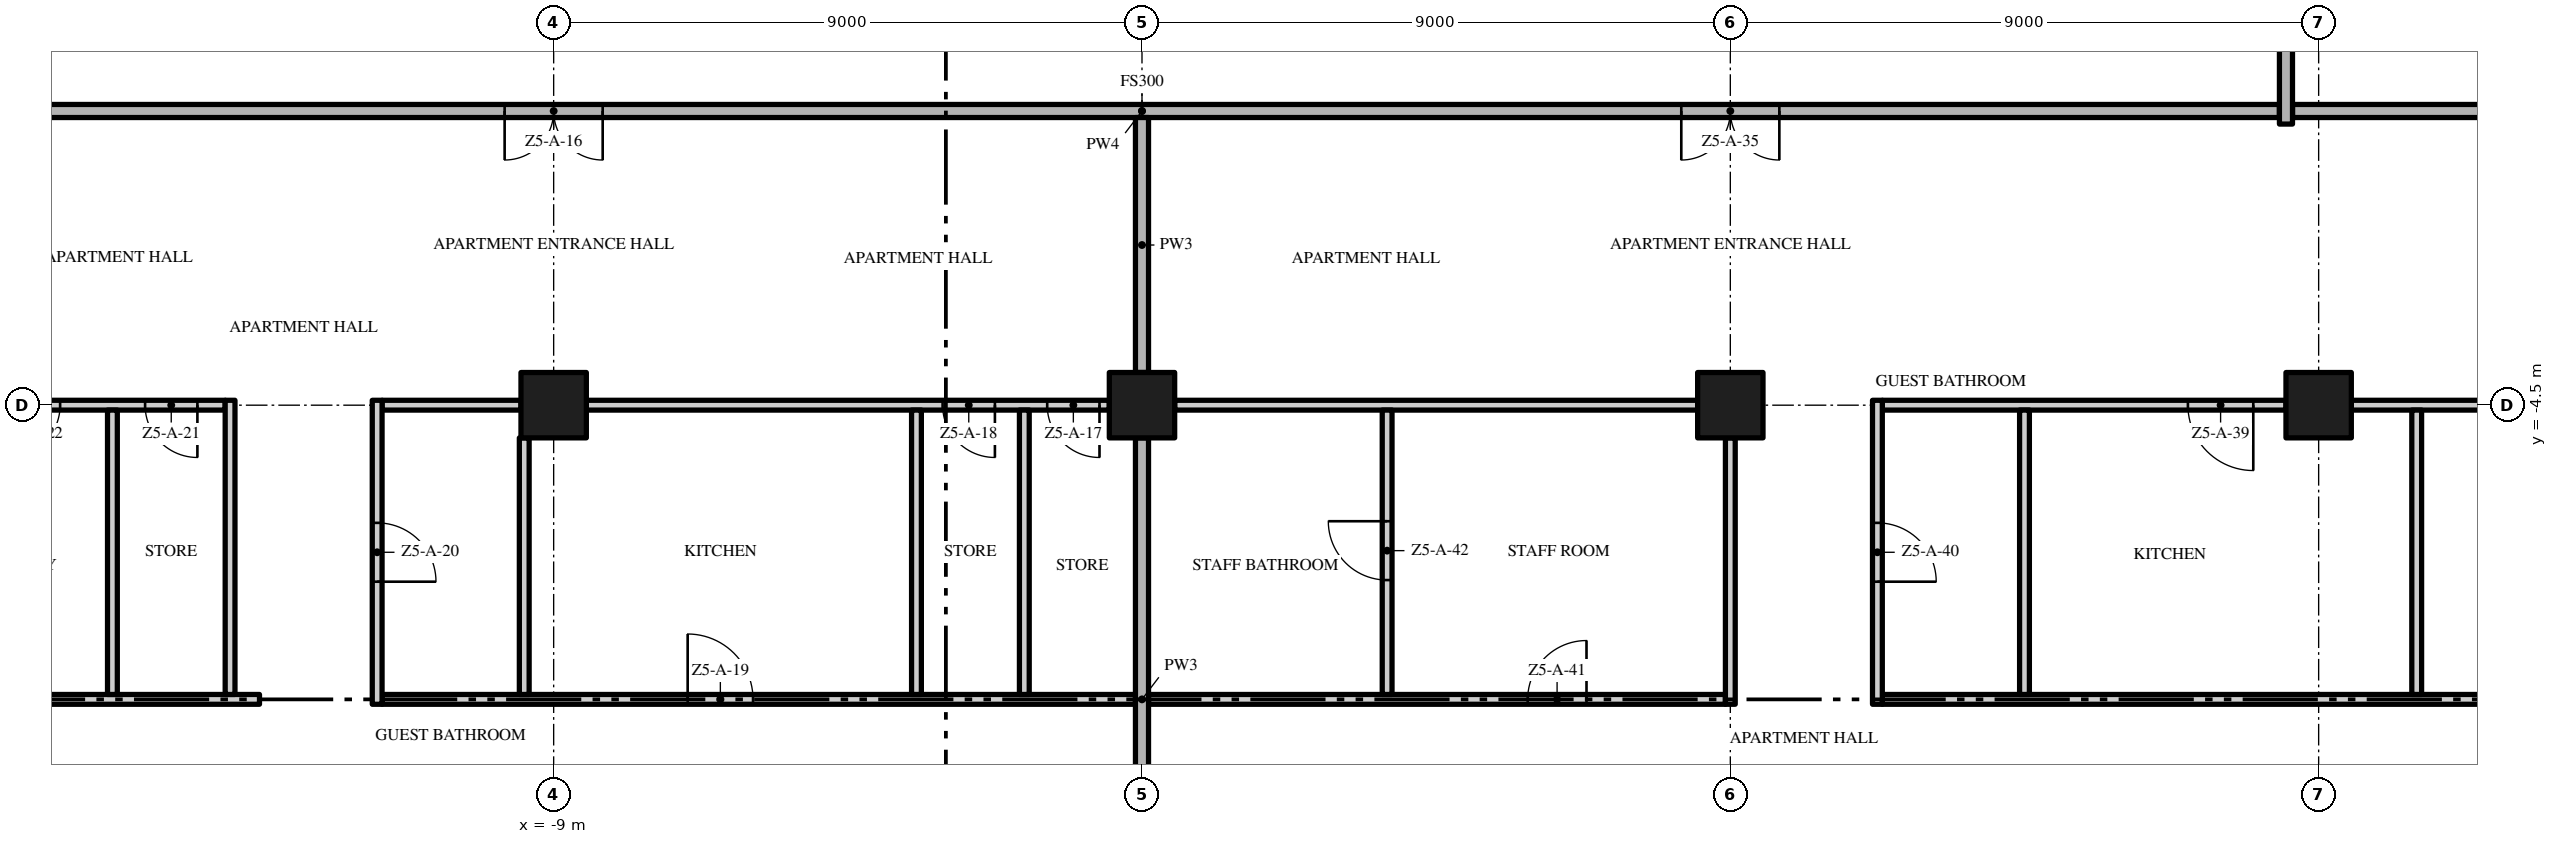
"""IFC4 building model, lengths in metres.
Left out: names, types, materials, properties, quantities, classifications, styles, units other than length and angle.
Written with IfcOpenShell. Run it as: python <this file> out.ifc"""

import sys

from ifc_helpers import new_model, si_unit, direction, frame, frame_2d, origin, origin_2d, place, context, subcontext, project, spatial, rectangle, extrude, element, fill, save


model = new_model("IFC4")
c1 = context("Model", 3, precision=1e-05, world=origin(), true_north=direction((0.0, 1.0)))
c2 = subcontext(c1, "Body", "Model", "MODEL_VIEW")
j1 = project(units=[si_unit("LENGTHUNIT", "METRE"), si_unit("PLANEANGLEUNIT", "RADIAN")], contexts=[c1])
p1 = place(None, origin())
s1 = spatial("IfcSite", under=j1, at=p1, CompositionType="ELEMENT")
p2 = place(p1, origin())
s2 = spatial("IfcBuilding", under=s1, at=p2, CompositionType="ELEMENT")
p3 = place(p2, frame((0.0, 0.0, 246.4)))
s3 = spatial("IfcBuildingStorey", under=s2, at=p3, CompositionType="ELEMENT", Elevation=246.4)
for number, where, z_axis, x_axis in (
    (1, (-9.0, -4.5, 0.0), (0.0, 0.0, 1.0), (1.0, 0.0, 0.0)),
    (2, (0.0, -4.5, 0.0), (0.0, 0.0, 1.0), (1.0, 0.0, 0.0)),
    (3, (18.0, -4.5, 0.0), (0.0, 0.0, 1.0), (1.0, 0.0, 0.0)),
    (4, (9.0, -4.5, 0.0), (0.0, 0.0, 1.0), (1.0, 0.0, 0.0)),
):
    element("IfcColumn", number, at=place(p3, frame(where, z_axis=z_axis, x_axis=x_axis)), inside=s3, PredefinedType="COLUMN", context=c2, shape_type="SweptSolid", body=[
        extrude(rectangle(XDim=1.0, YDim=1.0, at=origin_2d()), origin(), (0.0, 0.0, 1.0), 3.5),
    ])
p4 = place(p3, frame((-26.7, -9.0, 0.0), z_axis=(0.0, 0.0, 1.0), x_axis=(1.0, 0.0, 0.0)))
e5 = element("IfcWall", 5, at=p4, inside=s3, PredefinedType="PARTITIONING", context=c2, shape_type="SweptSolid", body=[
    extrude(rectangle(XDim=13.2, YDim=0.15, at=frame_2d((6.6, 0.0))), origin(), (0.0, 0.0, 1.0), 3.5),
])
p5 = place(p3, frame((-11.625, -9.0, 0.0), z_axis=(0.0, 0.0, 1.0), x_axis=(1.0, 0.0, 0.0)))
e6 = element("IfcWall", 6, at=p5, inside=s3, PredefinedType="PARTITIONING", context=c2, shape_type="SweptSolid", body=[
    extrude(rectangle(XDim=11.525, YDim=0.15, at=frame_2d((5.763, 0.0))), origin(), (0.0, 0.0, 1.0), 3.5),
])
p6 = place(p5, frame((4.675, 0.0, 0.0)))
e7 = element("IfcOpeningElement", 7, at=p6, cuts=e6, PredefinedType="OPENING", context=c2, shape_type="SweptSolid", body=[
    extrude(rectangle(XDim=1.0, YDim=2.4, at=frame_2d((0.5, 1.2))), frame((0.0, 0.085, 0.0), z_axis=(0.0, -1.0, 0.0), x_axis=(1.0, 0.0, 0.0)), (0.0, 0.0, 1.0), 0.17),
])
p7 = place(p3, frame((0.1, -9.0, 0.0), z_axis=(0.0, 0.0, 1.0), x_axis=(1.0, 0.0, 0.0)))
e8 = element("IfcWall", 8, at=p7, inside=s3, PredefinedType="PARTITIONING", context=c2, shape_type="SweptSolid", body=[
    extrude(rectangle(XDim=8.825, YDim=0.15, at=frame_2d((4.412, 0.0))), origin(), (0.0, 0.0, 1.0), 3.5),
])
p8 = place(p7, frame((5.8, 0.0, 0.0)))
e9 = element("IfcOpeningElement", 9, at=p8, cuts=e8, PredefinedType="OPENING", context=c2, shape_type="SweptSolid", body=[
    extrude(rectangle(XDim=0.9, YDim=2.1, at=frame_2d((0.45, 1.05))), frame((0.0, 0.085, 0.0), z_axis=(0.0, -1.0, 0.0), x_axis=(1.0, 0.0, 0.0)), (0.0, 0.0, 1.0), 0.17),
])
p9 = place(p3, frame((11.325, -9.0, 0.0), z_axis=(0.0, 0.0, 1.0), x_axis=(1.0, 0.0, 0.0)))
e10 = element("IfcWall", 10, at=p9, inside=s3, PredefinedType="PARTITIONING", context=c2, shape_type="SweptSolid", body=[
    extrude(rectangle(XDim=15.375, YDim=0.15, at=frame_2d((7.688, 0.0))), origin(), (0.0, 0.0, 1.0), 3.5),
])
p10 = place(p9, frame((14.375, 0.0, 0.0)))
e11 = element("IfcOpeningElement", 11, at=p10, cuts=e10, PredefinedType="OPENING", context=c2, shape_type="SweptSolid", body=[
    extrude(rectangle(XDim=0.8, YDim=2.0, at=frame_2d((0.4, 1.0))), frame((0.0, 0.085, 0.0), z_axis=(0.0, -1.0, 0.0), x_axis=(1.0, 0.0, 0.0)), (0.0, 0.0, 1.0), 0.17),
])
p11 = place(p3, frame((-14.025, -4.5, 0.0), z_axis=(0.0, 0.0, 1.0), x_axis=(-1.0, 0.0, 0.0)))
e12 = element("IfcWall", 12, at=p11, inside=s3, PredefinedType="PARTITIONING", context=c2, shape_type="SweptSolid", body=[
    extrude(rectangle(XDim=3.475, YDim=0.15, at=frame_2d((1.738, 0.0))), origin(), (0.0, 0.0, 1.0), 3.5),
])
p12 = place(p11, frame((0.425, 0.0, 0.0)))
e13 = element("IfcOpeningElement", 13, at=p12, cuts=e12, PredefinedType="OPENING", context=c2, shape_type="SweptSolid", body=[
    extrude(rectangle(XDim=0.8, YDim=2.0, at=frame_2d((0.4, 1.0))), frame((0.0, 0.085, 0.0), z_axis=(0.0, -1.0, 0.0), x_axis=(1.0, 0.0, 0.0)), (0.0, 0.0, 1.0), 0.17),
])
p13 = place(p11, frame((2.525, 0.0, 0.0)))
e14 = element("IfcOpeningElement", 14, at=p13, cuts=e12, PredefinedType="OPENING", context=c2, shape_type="SweptSolid", body=[
    extrude(rectangle(XDim=0.8, YDim=2.0, at=frame_2d((0.4, 1.0))), frame((0.0, 0.085, 0.0), z_axis=(0.0, -1.0, 0.0), x_axis=(1.0, 0.0, 0.0)), (0.0, 0.0, 1.0), 0.17),
])
p14 = place(p3, frame((-11.625, -4.5, 0.0), z_axis=(0.0, 0.0, 1.0), x_axis=(1.0, 0.0, 0.0)))
e15 = element("IfcWall", 15, at=p14, inside=s3, PredefinedType="PARTITIONING", context=c2, shape_type="SweptSolid", body=[
    extrude(rectangle(XDim=2.125, YDim=0.15, at=frame_2d((1.062, 0.0))), origin(), (0.0, 0.0, 1.0), 3.5),
])
p15 = place(p3, frame((-0.5, -4.5, 0.0), z_axis=(0.0, 0.0, 1.0), x_axis=(-1.0, 0.0, 0.0)))
e16 = element("IfcWall", 16, at=p15, inside=s3, PredefinedType="PARTITIONING", context=c2, shape_type="SweptSolid", body=[
    extrude(rectangle(XDim=8.0, YDim=0.15, at=frame_2d((4.0, 0.0))), origin(), (0.0, 0.0, 1.0), 3.5),
])
p16 = place(p15, frame((0.15, 0.0, 0.0)))
e17 = element("IfcOpeningElement", 17, at=p16, cuts=e16, PredefinedType="OPENING", context=c2, shape_type="SweptSolid", body=[
    extrude(rectangle(XDim=0.8, YDim=2.0, at=frame_2d((0.4, 1.0))), frame((0.0, 0.085, 0.0), z_axis=(0.0, -1.0, 0.0), x_axis=(1.0, 0.0, 0.0)), (0.0, 0.0, 1.0), 0.17),
])
p17 = place(p15, frame((1.75, 0.0, 0.0)))
e18 = element("IfcOpeningElement", 18, at=p17, cuts=e16, PredefinedType="OPENING", context=c2, shape_type="SweptSolid", body=[
    extrude(rectangle(XDim=0.8, YDim=2.0, at=frame_2d((0.4, 1.0))), frame((0.0, 0.085, 0.0), z_axis=(0.0, -1.0, 0.0), x_axis=(1.0, 0.0, 0.0)), (0.0, 0.0, 1.0), 0.17),
])
p18 = place(p3, frame((0.5, -4.5, 0.0), z_axis=(0.0, 0.0, 1.0), x_axis=(1.0, 0.0, 0.0)))
e19 = element("IfcWall", 19, at=p18, inside=s3, PredefinedType="PARTITIONING", context=c2, shape_type="SweptSolid", body=[
    extrude(rectangle(XDim=8.0, YDim=0.15, at=frame_2d((4.0, 0.0))), origin(), (0.0, 0.0, 1.0), 3.5),
])
p19 = place(p3, frame((17.5, -4.5, 0.0), z_axis=(0.0, 0.0, 1.0), x_axis=(-1.0, 0.0, 0.0)))
e20 = element("IfcWall", 20, at=p19, inside=s3, PredefinedType="PARTITIONING", context=c2, shape_type="SweptSolid", body=[
    extrude(rectangle(XDim=6.175, YDim=0.15, at=frame_2d((3.087, 0.0))), origin(), (0.0, 0.0, 1.0), 3.5),
])
p20 = place(p19, frame((0.5, 0.0, 0.0)))
e21 = element("IfcOpeningElement", 21, at=p20, cuts=e20, PredefinedType="OPENING", context=c2, shape_type="SweptSolid", body=[
    extrude(rectangle(XDim=1.0, YDim=2.4, at=frame_2d((0.5, 1.2))), frame((0.0, 0.085, 0.0), z_axis=(0.0, -1.0, 0.0), x_axis=(1.0, 0.0, 0.0)), (0.0, 0.0, 1.0), 0.17),
])
p21 = place(p3, frame((26.1, -4.5, 0.0), z_axis=(0.0, 0.0, 1.0), x_axis=(-1.0, 0.0, 0.0)))
e22 = element("IfcWall", 22, at=p21, inside=s3, PredefinedType="PARTITIONING", context=c2, shape_type="SweptSolid", body=[
    extrude(rectangle(XDim=7.6, YDim=0.15, at=frame_2d((3.8, 0.0))), origin(), (0.0, 0.0, 1.0), 3.5),
])
p22 = place(p21, frame((1.85, 0.0, 0.0)))
e23 = element("IfcOpeningElement", 23, at=p22, cuts=e22, PredefinedType="OPENING", context=c2, shape_type="SweptSolid", body=[
    extrude(rectangle(XDim=0.8, YDim=2.0, at=frame_2d((0.4, 1.0))), frame((0.0, 0.085, 0.0), z_axis=(0.0, -1.0, 0.0), x_axis=(1.0, 0.0, 0.0)), (0.0, 0.0, 1.0), 0.17),
])
p23 = place(p21, frame((4.7, 0.0, 0.0)))
e24 = element("IfcOpeningElement", 24, at=p23, cuts=e22, PredefinedType="OPENING", context=c2, shape_type="SweptSolid", body=[
    extrude(rectangle(XDim=0.8, YDim=2.0, at=frame_2d((0.4, 1.0))), frame((0.0, 0.085, 0.0), z_axis=(0.0, -1.0, 0.0), x_axis=(1.0, 0.0, 0.0)), (0.0, 0.0, 1.0), 0.17),
])
p24 = place(p3, frame((17.4, 0.0, 0.0), z_axis=(0.0, 0.0, 1.0), x_axis=(-1.0, 0.0, 0.0)))
e25 = element("IfcWall", 25, at=p24, inside=s3, PredefinedType="PARTITIONING", context=c2, shape_type="SweptSolid", body=[
    extrude(rectangle(XDim=34.8, YDim=0.2, at=frame_2d((17.4, 0.0))), origin(), (0.0, 0.0, 1.0), 3.5),
])
p25 = place(p24, frame((25.65, 0.0, 0.0)))
e26 = element("IfcOpeningElement", 26, at=p25, cuts=e25, PredefinedType="OPENING", context=c2, shape_type="SweptSolid", body=[
    extrude(rectangle(XDim=1.5, YDim=2.4, at=frame_2d((0.75, 1.2))), frame((0.0, 0.11, 0.0), z_axis=(0.0, -1.0, 0.0), x_axis=(1.0, 0.0, 0.0)), (0.0, 0.0, 1.0), 0.22),
])
p26 = place(p24, frame((7.65, 0.0, 0.0)))
e27 = element("IfcOpeningElement", 27, at=p26, cuts=e25, PredefinedType="OPENING", context=c2, shape_type="SweptSolid", body=[
    extrude(rectangle(XDim=1.5, YDim=2.4, at=frame_2d((0.75, 1.2))), frame((0.0, 0.11, 0.0), z_axis=(0.0, -1.0, 0.0), x_axis=(1.0, 0.0, 0.0)), (0.0, 0.0, 1.0), 0.22),
])
p27 = place(p3, frame((17.6, 0.0, 0.0), z_axis=(0.0, 0.0, 1.0), x_axis=(1.0, 0.0, 0.0)))
e28 = element("IfcWall", 28, at=p27, inside=s3, PredefinedType="PARTITIONING", context=c2, shape_type="SweptSolid", body=[
    extrude(rectangle(XDim=9.1, YDim=0.2, at=frame_2d((4.55, 0.0))), origin(), (0.0, 0.0, 1.0), 3.5),
])
p28 = place(p3, frame((-15.75, -8.925, 0.0), z_axis=(0.0, 0.0, 1.0), x_axis=(0.0, 1.0, 0.0)))
e29 = element("IfcWall", 29, at=p28, inside=s3, PredefinedType="PARTITIONING", context=c2, shape_type="SweptSolid", body=[
    extrude(rectangle(XDim=4.35, YDim=0.15, at=frame_2d((2.175, 0.0))), origin(), (0.0, 0.0, 1.0), 3.5),
])
p29 = place(p3, frame((-13.95, -8.925, 0.0), z_axis=(0.0, 0.0, 1.0), x_axis=(0.0, 1.0, 0.0)))
e30 = element("IfcWall", 30, at=p29, inside=s3, PredefinedType="PARTITIONING", context=c2, shape_type="SweptSolid", body=[
    extrude(rectangle(XDim=4.5, YDim=0.15, at=frame_2d((2.25, 0.0))), origin(), (0.0, 0.0, 1.0), 3.5),
])
p30 = place(p3, frame((-11.7, -4.425, 0.0), z_axis=(0.0, 0.0, 1.0), x_axis=(0.0, -1.0, 0.0)))
e31 = element("IfcWall", 31, at=p30, inside=s3, PredefinedType="PARTITIONING", context=c2, shape_type="SweptSolid", body=[
    extrude(rectangle(XDim=4.65, YDim=0.15, at=frame_2d((2.325, 0.0))), origin(), (0.0, 0.0, 1.0), 3.5),
])
p31 = place(p30, frame((1.875, 0.0, 0.0)))
e32 = element("IfcOpeningElement", 32, at=p31, cuts=e31, PredefinedType="OPENING", context=c2, shape_type="SweptSolid", body=[
    extrude(rectangle(XDim=0.9, YDim=2.1, at=frame_2d((0.45, 1.05))), frame((0.0, 0.085, 0.0), z_axis=(0.0, -1.0, 0.0), x_axis=(1.0, 0.0, 0.0)), (0.0, 0.0, 1.0), 0.17),
])
p32 = place(p3, frame((-9.45, -8.925, 0.0), z_axis=(0.0, 0.0, 1.0), x_axis=(0.0, 1.0, 0.0)))
e33 = element("IfcWall", 33, at=p32, inside=s3, PredefinedType="PARTITIONING", context=c2, shape_type="SweptSolid", body=[
    extrude(rectangle(XDim=3.925, YDim=0.15, at=frame_2d((1.962, 0.0))), origin(), (0.0, 0.0, 1.0), 3.5),
])
for number, where, z_axis, x_axis in (
    (34, (-3.45, -8.925, 0.0), (0.0, 0.0, 1.0), (0.0, 1.0, 0.0)),
    (35, (-1.8, -8.925, 0.0), (0.0, 0.0, 1.0), (0.0, 1.0, 0.0)),
):
    element("IfcWall", number, at=place(p3, frame(where, z_axis=z_axis, x_axis=x_axis)), inside=s3, PredefinedType="PARTITIONING", context=c2, shape_type="SweptSolid", body=[
        extrude(rectangle(XDim=4.35, YDim=0.15, at=frame_2d((2.175, 0.0))), origin(), (0.0, 0.0, 1.0), 3.5),
    ])
p33 = place(p3, frame((0.0, -13.0, 0.0), z_axis=(0.0, 0.0, 1.0), x_axis=(0.0, 1.0, 0.0)))
e36 = element("IfcWall", 36, at=p33, inside=s3, PredefinedType="PARTITIONING", context=c2, shape_type="SweptSolid", body=[
    extrude(rectangle(XDim=8.0, YDim=0.2, at=frame_2d((4.0, 0.0))), origin(), (0.0, 0.0, 1.0), 3.5),
])
p34 = place(p3, frame((0.0, -4.0, 0.0), z_axis=(0.0, 0.0, 1.0), x_axis=(0.0, 1.0, 0.0)))
e37 = element("IfcWall", 37, at=p34, inside=s3, PredefinedType="PARTITIONING", context=c2, shape_type="SweptSolid", body=[
    extrude(rectangle(XDim=3.9, YDim=0.2, at=frame_2d((1.95, 0.0))), origin(), (0.0, 0.0, 1.0), 3.5),
])
p35 = place(p3, frame((3.75, -8.925, 0.0), z_axis=(0.0, 0.0, 1.0), x_axis=(0.0, 1.0, 0.0)))
e38 = element("IfcWall", 38, at=p35, inside=s3, PredefinedType="PARTITIONING", context=c2, shape_type="SweptSolid", body=[
    extrude(rectangle(XDim=4.35, YDim=0.15, at=frame_2d((2.175, 0.0))), origin(), (0.0, 0.0, 1.0), 3.5),
])
p36 = place(p35, frame((1.75, 0.0, 0.0)))
e39 = element("IfcOpeningElement", 39, at=p36, cuts=e38, PredefinedType="OPENING", context=c2, shape_type="SweptSolid", body=[
    extrude(rectangle(XDim=0.9, YDim=2.1, at=frame_2d((0.45, 1.05))), frame((0.0, 0.085, 0.0), z_axis=(0.0, -1.0, 0.0), x_axis=(1.0, 0.0, 0.0)), (0.0, 0.0, 1.0), 0.17),
])
p37 = place(p3, frame((9.0, -9.075, 0.0), z_axis=(0.0, 0.0, 1.0), x_axis=(0.0, 1.0, 0.0)))
e40 = element("IfcWall", 40, at=p37, inside=s3, PredefinedType="PARTITIONING", context=c2, shape_type="SweptSolid", body=[
    extrude(rectangle(XDim=4.075, YDim=0.15, at=frame_2d((2.038, 0.0))), origin(), (0.0, 0.0, 1.0), 3.5),
])
p38 = place(p3, frame((11.25, -4.425, 0.0), z_axis=(0.0, 0.0, 1.0), x_axis=(0.0, -1.0, 0.0)))
e41 = element("IfcWall", 41, at=p38, inside=s3, PredefinedType="PARTITIONING", context=c2, shape_type="SweptSolid", body=[
    extrude(rectangle(XDim=4.65, YDim=0.15, at=frame_2d((2.325, 0.0))), origin(), (0.0, 0.0, 1.0), 3.5),
])
p39 = place(p38, frame((1.875, 0.0, 0.0)))
e42 = element("IfcOpeningElement", 42, at=p39, cuts=e41, PredefinedType="OPENING", context=c2, shape_type="SweptSolid", body=[
    extrude(rectangle(XDim=0.9, YDim=2.1, at=frame_2d((0.45, 1.05))), frame((0.0, 0.085, 0.0), z_axis=(0.0, -1.0, 0.0), x_axis=(1.0, 0.0, 0.0)), (0.0, 0.0, 1.0), 0.17),
])
p40 = place(p3, frame((13.5, -8.925, 0.0), z_axis=(0.0, 0.0, 1.0), x_axis=(0.0, 1.0, 0.0)))
e43 = element("IfcWall", 43, at=p40, inside=s3, PredefinedType="PARTITIONING", context=c2, shape_type="SweptSolid", body=[
    extrude(rectangle(XDim=4.35, YDim=0.15, at=frame_2d((2.175, 0.0))), origin(), (0.0, 0.0, 1.0), 3.5),
])
p41 = place(p3, frame((17.5, -0.2, 0.0), z_axis=(0.0, 0.0, 1.0), x_axis=(0.0, 1.0, 0.0)))
e44 = element("IfcWall", 44, at=p41, inside=s3, PredefinedType="PARTITIONING", context=c2, shape_type="SweptSolid", body=[
    extrude(rectangle(XDim=4.2, YDim=0.2, at=frame_2d((2.1, 0.0))), origin(), (0.0, 0.0, 1.0), 3.5),
])
p42 = place(p3, frame((19.5, -8.925, 0.0), z_axis=(0.0, 0.0, 1.0), x_axis=(0.0, 1.0, 0.0)))
e45 = element("IfcWall", 45, at=p42, inside=s3, PredefinedType="PARTITIONING", context=c2, shape_type="SweptSolid", body=[
    extrude(rectangle(XDim=4.35, YDim=0.15, at=frame_2d((2.175, 0.0))), origin(), (0.0, 0.0, 1.0), 3.5),
])
p43 = place(p25, origin())
e46 = element("IfcDoor", 46, at=p43, inside=s3, OperationType="DOUBLE_DOOR_SINGLE_SWING", PredefinedType="DOOR", context=c2, shape_type="SweptSolid", body=[
    extrude(rectangle(XDim=1.5, YDim=2.4, at=frame_2d((0.75, 1.2))), frame((0.0, 0.025, 0.0), z_axis=(0.0, -1.0, 0.0), x_axis=(1.0, 0.0, 0.0)), (0.0, 0.0, 1.0), 0.05),
])
fill(e26, e46)
p44 = place(p16, origin())
e47 = element("IfcDoor", 47, at=p44, inside=s3, OperationType="SINGLE_SWING_LEFT", PredefinedType="DOOR", context=c2, shape_type="SweptSolid", body=[
    extrude(rectangle(XDim=0.8, YDim=2.0, at=frame_2d((0.4, 1.0))), frame((0.0, 0.025, 0.0), z_axis=(0.0, -1.0, 0.0), x_axis=(1.0, 0.0, 0.0)), (0.0, 0.0, 1.0), 0.05),
])
fill(e17, e47)
p45 = place(p17, origin())
e48 = element("IfcDoor", 48, at=p45, inside=s3, OperationType="SINGLE_SWING_LEFT", PredefinedType="DOOR", context=c2, shape_type="SweptSolid", body=[
    extrude(rectangle(XDim=0.8, YDim=2.0, at=frame_2d((0.4, 1.0))), frame((0.0, 0.025, 0.0), z_axis=(0.0, -1.0, 0.0), x_axis=(1.0, 0.0, 0.0)), (0.0, 0.0, 1.0), 0.05),
])
fill(e18, e48)
p46 = place(p6, origin())
e49 = element("IfcDoor", 49, at=p46, inside=s3, OperationType="SINGLE_SWING_LEFT", PredefinedType="DOOR", context=c2, shape_type="SweptSolid", body=[
    extrude(rectangle(XDim=1.0, YDim=2.4, at=frame_2d((0.5, 1.2))), frame((0.0, 0.025, 0.0), z_axis=(0.0, -1.0, 0.0), x_axis=(1.0, 0.0, 0.0)), (0.0, 0.0, 1.0), 0.05),
])
fill(e7, e49)
p47 = place(p31, origin())
e50 = element("IfcDoor", 50, at=p47, inside=s3, OperationType="SINGLE_SWING_RIGHT", PredefinedType="DOOR", context=c2, shape_type="SweptSolid", body=[
    extrude(rectangle(XDim=0.9, YDim=2.1, at=frame_2d((0.45, 1.05))), frame((0.0, 0.025, 0.0), z_axis=(0.0, -1.0, 0.0), x_axis=(1.0, 0.0, 0.0)), (0.0, 0.0, 1.0), 0.05),
])
fill(e32, e50)
p48 = place(p12, origin())
e51 = element("IfcDoor", 51, at=p48, inside=s3, OperationType="SINGLE_SWING_LEFT", PredefinedType="DOOR", context=c2, shape_type="SweptSolid", body=[
    extrude(rectangle(XDim=0.8, YDim=2.0, at=frame_2d((0.4, 1.0))), frame((0.0, 0.025, 0.0), z_axis=(0.0, -1.0, 0.0), x_axis=(1.0, 0.0, 0.0)), (0.0, 0.0, 1.0), 0.05),
])
fill(e13, e51)
p49 = place(p13, origin())
e52 = element("IfcDoor", 52, at=p49, inside=s3, OperationType="SINGLE_SWING_RIGHT", PredefinedType="DOOR", context=c2, shape_type="SweptSolid", body=[
    extrude(rectangle(XDim=0.8, YDim=2.0, at=frame_2d((0.4, 1.0))), frame((0.0, 0.025, 0.0), z_axis=(0.0, -1.0, 0.0), x_axis=(1.0, 0.0, 0.0)), (0.0, 0.0, 1.0), 0.05),
])
fill(e14, e52)
p50 = place(p26, origin())
e53 = element("IfcDoor", 53, at=p50, inside=s3, OperationType="DOUBLE_DOOR_SINGLE_SWING", PredefinedType="DOOR", context=c2, shape_type="SweptSolid", body=[
    extrude(rectangle(XDim=1.5, YDim=2.4, at=frame_2d((0.75, 1.2))), frame((0.0, 0.025, 0.0), z_axis=(0.0, -1.0, 0.0), x_axis=(1.0, 0.0, 0.0)), (0.0, 0.0, 1.0), 0.05),
])
fill(e27, e53)
p51 = place(p20, origin())
e54 = element("IfcDoor", 54, at=p51, inside=s3, OperationType="SINGLE_SWING_LEFT", PredefinedType="DOOR", context=c2, shape_type="SweptSolid", body=[
    extrude(rectangle(XDim=1.0, YDim=2.4, at=frame_2d((0.5, 1.2))), frame((0.0, 0.025, 0.0), z_axis=(0.0, -1.0, 0.0), x_axis=(1.0, 0.0, 0.0)), (0.0, 0.0, 1.0), 0.05),
])
fill(e21, e54)
p52 = place(p39, origin())
e55 = element("IfcDoor", 55, at=p52, inside=s3, OperationType="SINGLE_SWING_RIGHT", PredefinedType="DOOR", context=c2, shape_type="SweptSolid", body=[
    extrude(rectangle(XDim=0.9, YDim=2.1, at=frame_2d((0.45, 1.05))), frame((0.0, 0.025, 0.0), z_axis=(0.0, -1.0, 0.0), x_axis=(1.0, 0.0, 0.0)), (0.0, 0.0, 1.0), 0.05),
])
fill(e42, e55)
p53 = place(p8, origin())
e56 = element("IfcDoor", 56, at=p53, inside=s3, OperationType="SINGLE_SWING_RIGHT", PredefinedType="DOOR", context=c2, shape_type="SweptSolid", body=[
    extrude(rectangle(XDim=0.9, YDim=2.1, at=frame_2d((0.45, 1.05))), frame((0.0, 0.025, 0.0), z_axis=(0.0, -1.0, 0.0), x_axis=(1.0, 0.0, 0.0)), (0.0, 0.0, 1.0), 0.05),
])
fill(e9, e56)
p54 = place(p36, origin())
e57 = element("IfcDoor", 57, at=p54, inside=s3, OperationType="SINGLE_SWING_RIGHT", PredefinedType="DOOR", context=c2, shape_type="SweptSolid", body=[
    extrude(rectangle(XDim=0.9, YDim=2.1, at=frame_2d((0.45, 1.05))), frame((0.0, 0.025, 0.0), z_axis=(0.0, -1.0, 0.0), x_axis=(1.0, 0.0, 0.0)), (0.0, 0.0, 1.0), 0.05),
])
fill(e39, e57)
save(model, sys.argv[1])
